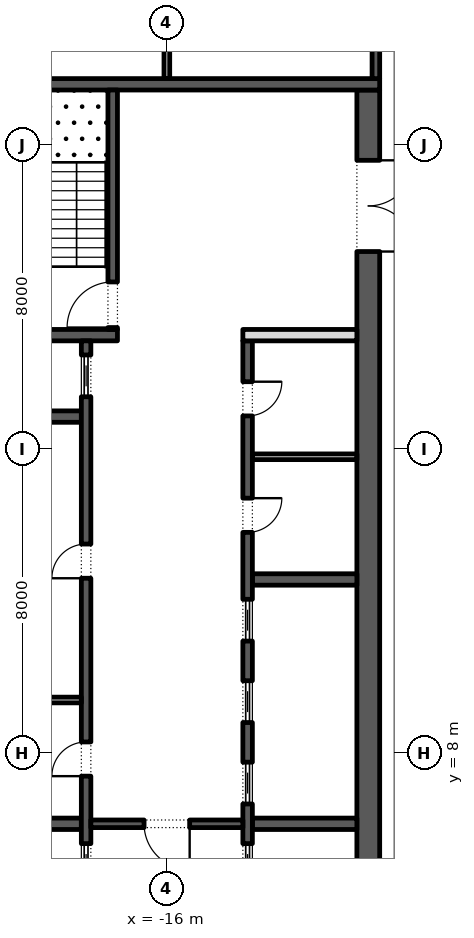
"""IFC4 building model, lengths in metres.
Left out: names, types, materials, properties, quantities, classifications, styles, units other than length and angle.
Written with IfcOpenShell. Run it as: python <this file> out.ifc"""

import sys

from ifc_helpers import new_model, si_unit, direction, frame, frame_2d, origin, place, context, subcontext, project, spatial, rectangle, extrude, element, fill, save


model = new_model("IFC4")
c1 = context("Model", 3, precision=1e-05, world=origin(), true_north=direction((0.0, 1.0)))
c2 = subcontext(c1, "Body", "Model", "MODEL_VIEW")
j1 = project(units=[si_unit("LENGTHUNIT", "METRE"), si_unit("PLANEANGLEUNIT", "RADIAN")], contexts=[c1])
p1 = place(None, origin())
s1 = spatial("IfcSite", under=j1, at=p1, CompositionType="ELEMENT")
p2 = place(p1, origin())
s2 = spatial("IfcBuilding", under=s1, at=p2, CompositionType="ELEMENT")
p3 = place(p2, frame((0.0, 0.0, 247.2)))
s3 = spatial("IfcBuildingStorey", under=s2, at=p3, CompositionType="ELEMENT", Elevation=247.2)
p4 = place(p3, frame((-10.7, -2.45, 0.0), z_axis=(0.0, 0.0, 1.0), x_axis=(0.0, 1.0, 0.0)))
e1 = element("IfcWall", 1, at=p4, inside=s3, PredefinedType="SHEAR", context=c2, shape_type="SweptSolid", body=[
    extrude(rectangle(XDim=27.9, YDim=0.6, at=frame_2d((13.95, 0.0))), origin(), (0.0, 0.0, 1.0), 4.0),
])
p5 = place(p4, frame((23.65, 0.0, 0.0)))
e2 = element("IfcOpeningElement", 2, at=p5, cuts=e1, PredefinedType="OPENING", context=c2, shape_type="SweptSolid", body=[
    extrude(rectangle(XDim=2.4, YDim=2.1, at=frame_2d((1.2, 1.05))), frame((0.0, 0.31, 0.0), z_axis=(0.0, -1.0, 0.0), x_axis=(1.0, 0.0, 0.0)), (0.0, 0.0, 1.0), 0.62),
])
p6 = place(p4, frame((1.087, 0.0, 0.0)))
e3 = element("IfcOpeningElement", 3, at=p6, cuts=e1, PredefinedType="OPENING", context=c2, shape_type="SweptSolid", body=[
    extrude(rectangle(XDim=0.9, YDim=2.1, at=frame_2d((0.45, 1.05))), frame((0.0, 0.31, 0.0), z_axis=(0.0, -1.0, 0.0), x_axis=(1.0, 0.0, 0.0)), (0.0, 0.0, 1.0), 0.62),
])
p7 = place(p4, frame((4.262, 0.0, 0.0)))
e4 = element("IfcOpeningElement", 4, at=p7, cuts=e1, PredefinedType="OPENING", context=c2, shape_type="SweptSolid", body=[
    extrude(rectangle(XDim=1.0, YDim=2.1, at=frame_2d((0.5, 1.05))), frame((0.0, 0.31, 0.0), z_axis=(0.0, -1.0, 0.0), x_axis=(1.0, 0.0, 0.0)), (0.0, 0.0, 1.0), 0.62),
])
p8 = place(p3, frame((-21.6, 25.6, 0.0), z_axis=(0.0, 0.0, 1.0), x_axis=(1.0, 0.0, 0.0)))
e5 = element("IfcWall", 5, at=p8, inside=s3, PredefinedType="SHEAR", context=c2, shape_type="SweptSolid", body=[
    extrude(rectangle(XDim=11.2, YDim=0.3, at=frame_2d((5.6, 0.0))), origin(), (0.0, 0.0, 1.0), 4.0),
])
p9 = place(p3, frame((-21.0, 19.0, 0.0), z_axis=(0.0, 0.0, 1.0), x_axis=(1.0, 0.0, 0.0)))
e6 = element("IfcWall", 6, at=p9, inside=s3, PredefinedType="SHEAR", context=c2, shape_type="SweptSolid", body=[
    extrude(rectangle(XDim=3.7, YDim=0.3, at=frame_2d((1.85, 0.0))), origin(), (0.0, 0.0, 1.0), 4.0),
])
p10 = place(p3, frame((-17.425, 19.15, 0.0), z_axis=(0.0, 0.0, 1.0), x_axis=(0.0, 1.0, 0.0)))
e7 = element("IfcWall", 7, at=p10, inside=s3, PredefinedType="SHEAR", context=c2, shape_type="SweptSolid", body=[
    extrude(rectangle(XDim=6.3, YDim=0.25, at=frame_2d((3.15, 0.0))), origin(), (0.0, 0.0, 1.0), 4.0),
])
p11 = place(p10, frame((0.05, 0.0, 0.0)))
e8 = element("IfcOpeningElement", 8, at=p11, cuts=e7, PredefinedType="OPENING", context=c2, shape_type="SweptSolid", body=[
    extrude(rectangle(XDim=1.2, YDim=2.1, at=frame_2d((0.6, 1.05))), frame((0.0, 0.135, 0.0), z_axis=(0.0, -1.0, 0.0), x_axis=(1.0, 0.0, 0.0)), (0.0, 0.0, 1.0), 0.27),
])
for number, where, z_axis, x_axis in (
    (9, (-21.0, 6.143, 0.0), (0.0, 0.0, 1.0), (1.0, 0.0, 0.0)),
    (10, (-21.0, 16.857, 0.0), (0.0, 0.0, 1.0), (1.0, 0.0, 0.0)),
):
    element("IfcWall", number, at=place(p3, frame(where, z_axis=z_axis, x_axis=x_axis)), inside=s3, PredefinedType="SHEAR", context=c2, shape_type="SweptSolid", body=[
        extrude(rectangle(XDim=2.75, YDim=0.3, at=frame_2d((1.375, 0.0))), origin(), (0.0, 0.0, 1.0), 4.0),
    ])
p12 = place(p3, frame((-18.125, 4.15, 0.0), z_axis=(0.0, 0.0, 1.0), x_axis=(0.0, 1.0, 0.0)))
e11 = element("IfcWall", 11, at=p12, inside=s3, PredefinedType="SHEAR", context=c2, shape_type="SweptSolid", body=[
    extrude(rectangle(XDim=14.7, YDim=0.25, at=frame_2d((7.35, 0.0))), origin(), (0.0, 0.0, 1.0), 4.0),
])
p13 = place(p12, frame((3.246, 0.0, 0.0)))
e12 = element("IfcOpeningElement", 12, at=p13, cuts=e11, PredefinedType="OPENING", context=c2, shape_type="SweptSolid", body=[
    extrude(rectangle(XDim=0.9, YDim=2.1, at=frame_2d((0.45, 1.05))), frame((0.0, 0.135, 0.0), z_axis=(0.0, -1.0, 0.0), x_axis=(1.0, 0.0, 0.0)), (0.0, 0.0, 1.0), 0.27),
])
p14 = place(p12, frame((8.454, 0.0, 0.0)))
e13 = element("IfcOpeningElement", 13, at=p14, cuts=e11, PredefinedType="OPENING", context=c2, shape_type="SweptSolid", body=[
    extrude(rectangle(XDim=0.9, YDim=2.1, at=frame_2d((0.45, 1.05))), frame((0.0, 0.135, 0.0), z_axis=(0.0, -1.0, 0.0), x_axis=(1.0, 0.0, 0.0)), (0.0, 0.0, 1.0), 0.27),
])
p15 = place(p12, frame((0.371, 0.0, 0.0)))
e14 = element("IfcOpeningElement", 14, at=p15, cuts=e11, PredefinedType="OPENING", context=c2, shape_type="SweptSolid", body=[
    extrude(rectangle(XDim=1.1, YDim=2.1, at=frame_2d((0.55, 1.05))), frame((0.0, 0.135, 0.0), z_axis=(0.0, -1.0, 0.0), x_axis=(1.0, 0.0, 0.0)), (0.0, 0.0, 1.0), 0.27),
])
p16 = place(p12, frame((13.229, 0.0, 0.0)))
e15 = element("IfcOpeningElement", 15, at=p16, cuts=e11, PredefinedType="OPENING", context=c2, shape_type="SweptSolid", body=[
    extrude(rectangle(XDim=1.1, YDim=2.1, at=frame_2d((0.55, 1.05))), frame((0.0, 0.135, 0.0), z_axis=(0.0, -1.0, 0.0), x_axis=(1.0, 0.0, 0.0)), (0.0, 0.0, 1.0), 0.27),
])
p17 = place(p3, frame((-21.0, 9.4, 0.0), z_axis=(0.0, 0.0, 1.0), x_axis=(1.0, 0.0, 0.0)))
e16 = element("IfcWall", 16, at=p17, inside=s3, PredefinedType="PARTITIONING", context=c2, shape_type="SweptSolid", body=[
    extrude(rectangle(XDim=2.75, YDim=0.15, at=frame_2d((1.375, 0.0))), origin(), (0.0, 0.0, 1.0), 4.0),
])
for number, where, z_axis, x_axis in (
    (17, (-13.75, 6.143, 0.0), (0.0, 0.0, 1.0), (1.0, 0.0, 0.0)),
    (18, (-13.75, 12.571, 0.0), (0.0, 0.0, 1.0), (1.0, 0.0, 0.0)),
):
    element("IfcWall", number, at=place(p3, frame(where, z_axis=z_axis, x_axis=x_axis)), inside=s3, PredefinedType="SHEAR", context=c2, shape_type="SweptSolid", body=[
        extrude(rectangle(XDim=2.75, YDim=0.3, at=frame_2d((1.375, 0.0))), origin(), (0.0, 0.0, 1.0), 4.0),
    ])
p18 = place(p3, frame((-13.875, -2.45, 0.0), z_axis=(0.0, 0.0, 1.0), x_axis=(0.0, 1.0, 0.0)))
e19 = element("IfcWall", 19, at=p18, inside=s3, PredefinedType="SHEAR", context=c2, shape_type="SweptSolid", body=[
    extrude(rectangle(XDim=21.3, YDim=0.25, at=frame_2d((10.65, 0.0))), origin(), (0.0, 0.0, 1.0), 4.0),
])
p19 = place(p18, frame((16.261, 0.0, 0.0)))
e20 = element("IfcOpeningElement", 20, at=p19, cuts=e19, PredefinedType="OPENING", context=c2, shape_type="SweptSolid", body=[
    extrude(rectangle(XDim=0.9, YDim=2.1, at=frame_2d((0.45, 1.05))), frame((0.0, 0.135, 0.0), z_axis=(0.0, -1.0, 0.0), x_axis=(1.0, 0.0, 0.0)), (0.0, 0.0, 1.0), 0.27),
])
p20 = place(p18, frame((19.325, 0.0, 0.0)))
e21 = element("IfcOpeningElement", 21, at=p20, cuts=e19, PredefinedType="OPENING", context=c2, shape_type="SweptSolid", body=[
    extrude(rectangle(XDim=0.9, YDim=2.1, at=frame_2d((0.45, 1.05))), frame((0.0, 0.135, 0.0), z_axis=(0.0, -1.0, 0.0), x_axis=(1.0, 0.0, 0.0)), (0.0, 0.0, 1.0), 0.27),
])
p21 = place(p18, frame((6.971, 0.0, 0.0)))
e22 = element("IfcOpeningElement", 22, at=p21, cuts=e19, PredefinedType="OPENING", context=c2, shape_type="SweptSolid", body=[
    extrude(rectangle(XDim=1.1, YDim=2.1, at=frame_2d((0.55, 1.05))), frame((0.0, 0.135, 0.0), z_axis=(0.0, -1.0, 0.0), x_axis=(1.0, 0.0, 0.0)), (0.0, 0.0, 1.0), 0.27),
])
p22 = place(p18, frame((9.114, 0.0, 0.0)))
e23 = element("IfcOpeningElement", 23, at=p22, cuts=e19, PredefinedType="OPENING", context=c2, shape_type="SweptSolid", body=[
    extrude(rectangle(XDim=1.1, YDim=2.1, at=frame_2d((0.55, 1.05))), frame((0.0, 0.135, 0.0), z_axis=(0.0, -1.0, 0.0), x_axis=(1.0, 0.0, 0.0)), (0.0, 0.0, 1.0), 0.27),
])
p23 = place(p18, frame((11.257, 0.0, 0.0)))
e24 = element("IfcOpeningElement", 24, at=p23, cuts=e19, PredefinedType="OPENING", context=c2, shape_type="SweptSolid", body=[
    extrude(rectangle(XDim=1.1, YDim=2.1, at=frame_2d((0.55, 1.05))), frame((0.0, 0.135, 0.0), z_axis=(0.0, -1.0, 0.0), x_axis=(1.0, 0.0, 0.0)), (0.0, 0.0, 1.0), 0.27),
])
p24 = place(p18, frame((13.4, 0.0, 0.0)))
e25 = element("IfcOpeningElement", 25, at=p24, cuts=e19, PredefinedType="OPENING", context=c2, shape_type="SweptSolid", body=[
    extrude(rectangle(XDim=1.1, YDim=2.1, at=frame_2d((0.55, 1.05))), frame((0.0, 0.135, 0.0), z_axis=(0.0, -1.0, 0.0), x_axis=(1.0, 0.0, 0.0)), (0.0, 0.0, 1.0), 0.27),
])
p25 = place(p3, frame((-14.0, 19.0, 0.0), z_axis=(0.0, 0.0, 1.0), x_axis=(1.0, 0.0, 0.0)))
e26 = element("IfcWall", 26, at=p25, inside=s3, PredefinedType="PARTITIONING", context=c2, shape_type="SweptSolid", body=[
    extrude(rectangle(XDim=3.0, YDim=0.3, at=frame_2d((1.5, 0.0))), origin(), (0.0, 0.0, 1.0), 4.0),
])
p26 = place(p3, frame((-13.75, 15.8, 0.0), z_axis=(0.0, 0.0, 1.0), x_axis=(1.0, 0.0, 0.0)))
e27 = element("IfcWall", 27, at=p26, inside=s3, PredefinedType="PARTITIONING", context=c2, shape_type="SweptSolid", body=[
    extrude(rectangle(XDim=2.75, YDim=0.15, at=frame_2d((1.375, 0.0))), origin(), (0.0, 0.0, 1.0), 4.0),
])
p27 = place(p3, frame((-18.0, 6.143, 0.0), z_axis=(0.0, 0.0, 1.0), x_axis=(1.0, 0.0, 0.0)))
e28 = element("IfcWall", 28, at=p27, inside=s3, PredefinedType="SHEAR", context=c2, shape_type="SweptSolid", body=[
    extrude(rectangle(XDim=4.0, YDim=0.2, at=frame_2d((2.0, 0.0))), origin(), (0.0, 0.0, 1.0), 4.0),
])
p28 = place(p27, frame((1.4, 0.0, 0.0)))
e29 = element("IfcOpeningElement", 29, at=p28, cuts=e28, PredefinedType="OPENING", context=c2, shape_type="SweptSolid", body=[
    extrude(rectangle(XDim=1.2, YDim=2.1, at=frame_2d((0.6, 1.05))), frame((0.0, 0.11, 0.0), z_axis=(0.0, -1.0, 0.0), x_axis=(1.0, 0.0, 0.0)), (0.0, 0.0, 1.0), 0.22),
])
p29 = place(p3, frame((-10.5, 25.75, 0.0), z_axis=(0.0, 0.0, 1.0), x_axis=(0.0, 1.0, 0.0)))
e30 = element("IfcWall", 30, at=p29, inside=s3, PredefinedType="SHEAR", context=c2, shape_type="SweptSolid", body=[
    extrude(rectangle(XDim=4.75, YDim=0.2, at=frame_2d((2.375, 0.0))), origin(), (0.0, 0.0, 1.0), 4.0),
])
p30 = place(p29, frame((1.925, 0.0, 0.0)))
e31 = element("IfcOpeningElement", 31, at=p30, cuts=e30, PredefinedType="OPENING", context=c2, shape_type="SweptSolid", body=[
    extrude(rectangle(XDim=0.9, YDim=2.1, at=frame_2d((0.45, 1.05))), frame((0.0, 0.11, 0.0), z_axis=(0.0, -1.0, 0.0), x_axis=(1.0, 0.0, 0.0)), (0.0, 0.0, 1.0), 0.22),
])
p31 = place(p3, frame((-16.0, 25.75, 0.0), z_axis=(0.0, 0.0, 1.0), x_axis=(0.0, 1.0, 0.0)))
e32 = element("IfcWall", 32, at=p31, inside=s3, PredefinedType="PARTITIONING", context=c2, shape_type="SweptSolid", body=[
    extrude(rectangle(XDim=4.75, YDim=0.15, at=frame_2d((2.375, 0.0))), origin(), (0.0, 0.0, 1.0), 4.0),
])
p32 = place(p13, origin())
e33 = element("IfcDoor", 33, at=p32, inside=s3, OperationType="SINGLE_SWING_RIGHT", PredefinedType="DOOR", context=c2, shape_type="SweptSolid", body=[
    extrude(rectangle(XDim=0.9, YDim=2.1, at=frame_2d((0.45, 1.05))), frame((0.0, 0.125, 0.0), z_axis=(0.0, -1.0, 0.0), x_axis=(1.0, 0.0, 0.0)), (0.0, 0.0, 1.0), 0.05),
])
fill(e12, e33)
p33 = place(p14, origin())
e34 = element("IfcDoor", 34, at=p33, inside=s3, OperationType="SINGLE_SWING_RIGHT", PredefinedType="DOOR", context=c2, shape_type="SweptSolid", body=[
    extrude(rectangle(XDim=0.9, YDim=2.1, at=frame_2d((0.45, 1.05))), frame((0.0, 0.125, 0.0), z_axis=(0.0, -1.0, 0.0), x_axis=(1.0, 0.0, 0.0)), (0.0, 0.0, 1.0), 0.05),
])
fill(e13, e34)
p34 = place(p15, origin())
e35 = element("IfcDoor", 35, at=p34, inside=s3, OperationType="SLIDING_TO_LEFT", PredefinedType="DOOR", context=c2, shape_type="SweptSolid", body=[
    extrude(rectangle(XDim=1.1, YDim=2.1, at=frame_2d((0.55, 1.05))), frame((0.0, 0.025, 0.0), z_axis=(0.0, -1.0, 0.0), x_axis=(1.0, 0.0, 0.0)), (0.0, 0.0, 1.0), 0.05),
])
fill(e14, e35)
p35 = place(p16, origin())
e36 = element("IfcDoor", 36, at=p35, inside=s3, OperationType="SLIDING_TO_LEFT", PredefinedType="DOOR", context=c2, shape_type="SweptSolid", body=[
    extrude(rectangle(XDim=1.1, YDim=2.1, at=frame_2d((0.55, 1.05))), frame((0.0, 0.025, 0.0), z_axis=(0.0, -1.0, 0.0), x_axis=(1.0, 0.0, 0.0)), (0.0, 0.0, 1.0), 0.05),
])
fill(e15, e36)
p36 = place(p19, frame((0.9, -0.2, 0.0), z_axis=(0.0, 0.0, 1.0), x_axis=(-1.0, 0.0, 0.0)))
e37 = element("IfcDoor", 37, at=p36, inside=s3, OperationType="SINGLE_SWING_RIGHT", PredefinedType="DOOR", context=c2, shape_type="SweptSolid", body=[
    extrude(rectangle(XDim=0.9, YDim=2.1, at=frame_2d((0.45, 1.05))), frame((0.0, -0.075, 0.0), z_axis=(0.0, -1.0, 0.0), x_axis=(1.0, 0.0, 0.0)), (0.0, 0.0, 1.0), 0.05),
])
fill(e20, e37)
p37 = place(p20, frame((0.9, -0.2, 0.0), z_axis=(0.0, 0.0, 1.0), x_axis=(-1.0, 0.0, 0.0)))
e38 = element("IfcDoor", 38, at=p37, inside=s3, OperationType="SINGLE_SWING_RIGHT", PredefinedType="DOOR", context=c2, shape_type="SweptSolid", body=[
    extrude(rectangle(XDim=0.9, YDim=2.1, at=frame_2d((0.45, 1.05))), frame((0.0, -0.075, 0.0), z_axis=(0.0, -1.0, 0.0), x_axis=(1.0, 0.0, 0.0)), (0.0, 0.0, 1.0), 0.05),
])
fill(e21, e38)
p38 = place(p21, origin())
e39 = element("IfcDoor", 39, at=p38, inside=s3, OperationType="SLIDING_TO_LEFT", PredefinedType="DOOR", context=c2, shape_type="SweptSolid", body=[
    extrude(rectangle(XDim=1.1, YDim=2.1, at=frame_2d((0.55, 1.05))), frame((0.0, 0.025, 0.0), z_axis=(0.0, -1.0, 0.0), x_axis=(1.0, 0.0, 0.0)), (0.0, 0.0, 1.0), 0.05),
])
fill(e22, e39)
p39 = place(p22, origin())
e40 = element("IfcDoor", 40, at=p39, inside=s3, OperationType="SLIDING_TO_LEFT", PredefinedType="DOOR", context=c2, shape_type="SweptSolid", body=[
    extrude(rectangle(XDim=1.1, YDim=2.1, at=frame_2d((0.55, 1.05))), frame((0.0, 0.025, 0.0), z_axis=(0.0, -1.0, 0.0), x_axis=(1.0, 0.0, 0.0)), (0.0, 0.0, 1.0), 0.05),
])
fill(e23, e40)
p40 = place(p23, origin())
e41 = element("IfcDoor", 41, at=p40, inside=s3, OperationType="SLIDING_TO_LEFT", PredefinedType="DOOR", context=c2, shape_type="SweptSolid", body=[
    extrude(rectangle(XDim=1.1, YDim=2.1, at=frame_2d((0.55, 1.05))), frame((0.0, 0.025, 0.0), z_axis=(0.0, -1.0, 0.0), x_axis=(1.0, 0.0, 0.0)), (0.0, 0.0, 1.0), 0.05),
])
fill(e24, e41)
p41 = place(p24, origin())
e42 = element("IfcDoor", 42, at=p41, inside=s3, OperationType="SLIDING_TO_LEFT", PredefinedType="DOOR", context=c2, shape_type="SweptSolid", body=[
    extrude(rectangle(XDim=1.1, YDim=2.1, at=frame_2d((0.55, 1.05))), frame((0.0, 0.025, 0.0), z_axis=(0.0, -1.0, 0.0), x_axis=(1.0, 0.0, 0.0)), (0.0, 0.0, 1.0), 0.05),
])
fill(e25, e42)
p42 = place(p28, frame((1.2, 0.0, 0.0), z_axis=(0.0, 0.0, 1.0), x_axis=(-1.0, 0.0, 0.0)))
e43 = element("IfcDoor", 43, at=p42, inside=s3, OperationType="SINGLE_SWING_RIGHT", PredefinedType="DOOR", context=c2, shape_type="SweptSolid", body=[
    extrude(rectangle(XDim=1.2, YDim=2.1, at=frame_2d((0.6, 1.05))), frame((0.0, 0.025, 0.0), z_axis=(0.0, -1.0, 0.0), x_axis=(1.0, 0.0, 0.0)), (0.0, 0.0, 1.0), 0.05),
])
fill(e29, e43)
p43 = place(p5, frame((2.4, 0.0, 0.0), z_axis=(0.0, 0.0, 1.0), x_axis=(-1.0, 0.0, 0.0)))
e44 = element("IfcDoor", 44, at=p43, inside=s3, OperationType="DOUBLE_DOOR_SINGLE_SWING", PredefinedType="DOOR", context=c2, shape_type="SweptSolid", body=[
    extrude(rectangle(XDim=2.4, YDim=2.1, at=frame_2d((1.2, 1.05))), frame((0.0, 0.025, 0.0), z_axis=(0.0, -1.0, 0.0), x_axis=(1.0, 0.0, 0.0)), (0.0, 0.0, 1.0), 0.05),
])
fill(e2, e44)
p44 = place(p11, origin())
e45 = element("IfcDoor", 45, at=p44, inside=s3, OperationType="SINGLE_SWING_RIGHT", PredefinedType="DOOR", context=c2, shape_type="SweptSolid", body=[
    extrude(rectangle(XDim=1.2, YDim=2.1, at=frame_2d((0.6, 1.05))), frame((0.0, 0.025, 0.0), z_axis=(0.0, -1.0, 0.0), x_axis=(1.0, 0.0, 0.0)), (0.0, 0.0, 1.0), 0.05),
])
fill(e8, e45)
save(model, sys.argv[1])
